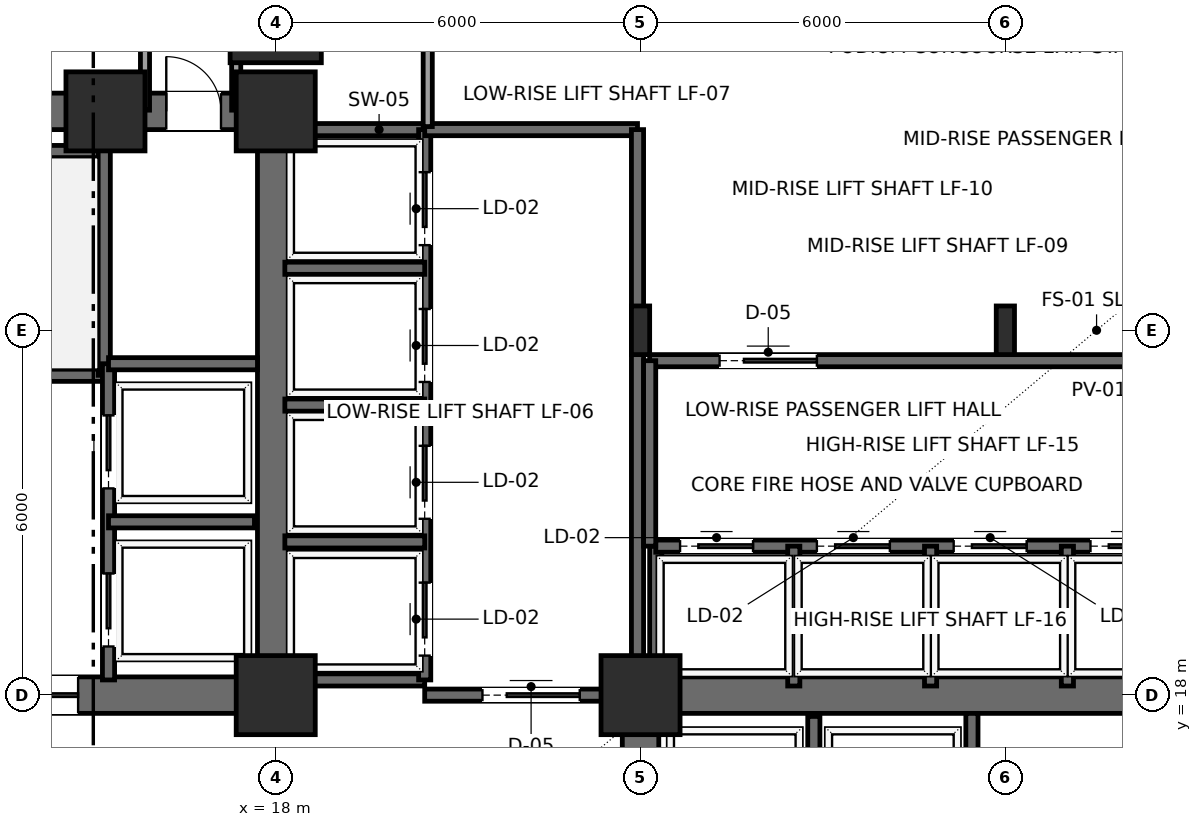
"""IFC4 building model, lengths in metres.
Left out: names, types, materials, properties, quantities, classifications, styles, units other than length and angle.
Written with IfcOpenShell. Run it as: python <this file> out.ifc"""

import sys

from ifc_helpers import new_model, si_unit, direction, frame, frame_2d, origin, origin_2d, place, context, subcontext, project, spatial, rectangle, i_section, extrude, element, fill, save


model = new_model("IFC4")
c1 = context("Model", 3, precision=1e-05, world=origin(), true_north=direction((0.0, 1.0)))
c2 = subcontext(c1, "Body", "Model", "MODEL_VIEW")
j1 = project(units=[si_unit("LENGTHUNIT", "METRE"), si_unit("PLANEANGLEUNIT", "RADIAN")], contexts=[c1])
p1 = place(None, origin())
s1 = spatial("IfcSite", under=j1, at=p1, CompositionType="ELEMENT")
p2 = place(p1, origin())
s2 = spatial("IfcBuilding", under=s1, at=p2, CompositionType="ELEMENT")
p3 = place(p2, origin())
s3 = spatial("IfcBuildingStorey", under=s2, at=p3, CompositionType="ELEMENT", Elevation=0.0)
for number, where, z_axis, x_axis in (
    (1, (18.0, 18.0, 0.0), (0.0, 0.0, 1.0), (1.0, 0.0, 0.0)),
    (2, (15.2, 27.6, 0.0), (0.0, 0.0, 1.0), (1.0, 0.0, 0.0)),
    (3, (18.0, 27.6, 0.0), (0.0, 0.0, 1.0), (1.0, 0.0, 0.0)),
    (4, (24.0, 18.0, 0.0), (0.0, 0.0, 1.0), (1.0, 0.0, 0.0)),
):
    element("IfcColumn", number, at=place(p3, frame(where, z_axis=z_axis, x_axis=x_axis)), inside=s3, PredefinedType="COLUMN", context=c2, shape_type="SweptSolid", body=[
        extrude(rectangle(XDim=1.3, YDim=1.3, at=origin_2d()), origin(), (0.0, 0.0, 1.0), 5.7),
    ])
p4 = place(p3, frame((18.0, 29.15, 0.0), z_axis=(0.0, 0.0, 1.0), x_axis=(1.0, 0.0, 0.0)))
e5 = element("IfcColumn", 5, at=p4, inside=s3, PredefinedType="COLUMN", context=c2, shape_type="SweptSolid", body=[
    extrude(rectangle(XDim=1.5, YDim=1.5, at=origin_2d()), origin(), (0.0, 0.0, 1.0), 5.7),
])
for number, where, z_axis, x_axis in (
    (6, (24.0, 24.0, 0.0), (0.0, 0.0, 1.0), (1.0, 0.0, 0.0)),
    (7, (30.0, 24.0, 0.0), (0.0, 0.0, 1.0), (1.0, 0.0, 0.0)),
):
    element("IfcColumn", number, at=place(p3, frame(where, z_axis=z_axis, x_axis=x_axis)), inside=s3, PredefinedType="COLUMN", context=c2, shape_type="SweptSolid", body=[
        extrude(i_section(OverallWidth=0.3, OverallDepth=0.8, WebThickness=0.018, FlangeThickness=0.033, FilletRadius=0.03, at=origin_2d()), origin(), (0.0, 0.0, 1.0), 5.7),
    ])
p5 = place(p3, frame((6.0, 18.0, 0.0), z_axis=(0.0, 0.0, 1.0), x_axis=(1.0, 0.0, 0.0)))
e8 = element("IfcWall", 8, at=p5, inside=s3, PredefinedType="SHEAR", context=c2, shape_type="SweptSolid", body=[
    extrude(rectangle(XDim=12.0, YDim=0.6, at=frame_2d((6.0, 0.0))), origin(), (0.0, 0.0, 1.0), 5.4),
])
p6 = place(p5, frame((7.15, 0.0, 0.0)))
e9 = element("IfcOpeningElement", 9, at=p6, cuts=e8, PredefinedType="OPENING", context=c2, shape_type="SweptSolid", body=[
    extrude(rectangle(XDim=1.6, YDim=2.3, at=frame_2d((0.8, 1.15))), frame((0.0, 0.31, 0.0), z_axis=(0.0, -1.0, 0.0), x_axis=(1.0, 0.0, 0.0)), (0.0, 0.0, 1.0), 0.62),
])
p7 = place(p3, frame((6.0, 27.6, 0.0), z_axis=(0.0, 0.0, 1.0), x_axis=(1.0, 0.0, 0.0)))
e10 = element("IfcWall", 10, at=p7, inside=s3, PredefinedType="SHEAR", context=c2, shape_type="SweptSolid", body=[
    extrude(rectangle(XDim=12.0, YDim=0.6, at=frame_2d((6.0, 0.0))), origin(), (0.0, 0.0, 1.0), 5.4),
])
p8 = place(p7, frame((10.2, 0.0, 0.0)))
e11 = element("IfcOpeningElement", 11, at=p8, cuts=e10, PredefinedType="OPENING", context=c2, shape_type="SweptSolid", body=[
    extrude(rectangle(XDim=0.9, YDim=2.15, at=frame_2d((0.45, 1.075))), frame((0.0, 0.31, 0.0), z_axis=(0.0, -1.0, 0.0), x_axis=(1.0, 0.0, 0.0)), (0.0, 0.0, 1.0), 0.62),
])
for number, where, z_axis, x_axis in (
    (12, (18.0, 18.0, 0.0), (0.0, 0.0, 1.0), (0.0, 1.0, 0.0)),
    (13, (24.0, 18.0, 0.0), (0.0, 0.0, 1.0), (1.0, 0.0, 0.0)),
):
    element("IfcWall", number, at=place(p3, frame(where, z_axis=z_axis, x_axis=x_axis)), inside=s3, PredefinedType="SHEAR", context=c2, shape_type="SweptSolid", body=[
        extrude(rectangle(XDim=9.6, YDim=0.6, at=frame_2d((4.8, 0.0))), origin(), (0.0, 0.0, 1.0), 5.4),
    ])
p9 = place(p3, frame((24.0, 6.0, 0.0), z_axis=(0.0, 0.0, 1.0), x_axis=(0.0, 1.0, 0.0)))
e14 = element("IfcWall", 14, at=p9, inside=s3, PredefinedType="SHEAR", context=c2, shape_type="SweptSolid", body=[
    extrude(rectangle(XDim=12.0, YDim=0.6, at=frame_2d((6.0, 0.0))), origin(), (0.0, 0.0, 1.0), 5.4),
])
p10 = place(p9, frame((7.15, 0.0, 0.0)))
e15 = element("IfcOpeningElement", 15, at=p10, cuts=e14, PredefinedType="OPENING", context=c2, shape_type="SweptSolid", body=[
    extrude(rectangle(XDim=1.6, YDim=2.3, at=frame_2d((0.8, 1.15))), frame((0.0, 0.31, 0.0), z_axis=(0.0, -1.0, 0.0), x_axis=(1.0, 0.0, 0.0)), (0.0, 0.0, 1.0), 0.62),
])
p11 = place(p3, frame((6.3, 23.26, 0.0), z_axis=(0.0, 0.0, 1.0), x_axis=(1.0, 0.0, 0.0)))
e16 = element("IfcWall", 16, at=p11, inside=s3, PredefinedType="SHEAR", context=c2, shape_type="SweptSolid", body=[
    extrude(rectangle(XDim=8.88, YDim=0.2, at=frame_2d((4.44, 0.0))), origin(), (0.0, 0.0, 1.0), 5.4),
])
p12 = place(p11, frame((0.35, 0.0, 0.0)))
e17 = element("IfcOpeningElement", 17, at=p12, cuts=e16, PredefinedType="OPENING", context=c2, shape_type="SweptSolid", body=[
    extrude(rectangle(XDim=1.1, YDim=2.2, at=frame_2d((0.55, 1.1))), frame((0.0, 0.11, 0.0), z_axis=(0.0, -1.0, 0.0), x_axis=(1.0, 0.0, 0.0)), (0.0, 0.0, 1.0), 0.22),
])
p13 = place(p3, frame((6.3, 26.94, 0.0), z_axis=(0.0, 0.0, 1.0), x_axis=(1.0, 0.0, 0.0)))
e18 = element("IfcWall", 18, at=p13, inside=s3, PredefinedType="SHEAR", context=c2, shape_type="SweptSolid", body=[
    extrude(rectangle(XDim=8.88, YDim=0.2, at=frame_2d((4.44, 0.0))), origin(), (0.0, 0.0, 1.0), 5.4),
])
p14 = place(p3, frame((15.18, 23.26, 0.0), z_axis=(0.0, 0.0, 1.0), x_axis=(0.0, 1.0, 0.0)))
e19 = element("IfcWall", 19, at=p14, inside=s3, PredefinedType="SHEAR", context=c2, shape_type="SweptSolid", body=[
    extrude(rectangle(XDim=4.04, YDim=0.2, at=frame_2d((2.02, 0.0))), origin(), (0.0, 0.0, 1.0), 5.4),
])
p15 = place(p3, frame((15.25, 18.25, 0.0), z_axis=(0.0, 0.0, 1.0), x_axis=(0.0, 1.0, 0.0)))
e20 = element("IfcWall", 20, at=p15, inside=s3, PredefinedType="SHEAR", context=c2, shape_type="SweptSolid", body=[
    extrude(rectangle(XDim=5.2, YDim=0.2, at=frame_2d((2.6, 0.0))), origin(), (0.0, 0.0, 1.0), 5.4),
])
p16 = place(p15, frame((0.55, 0.0, 0.0)))
e21 = element("IfcOpeningElement", 21, at=p16, cuts=e20, PredefinedType="OPENING", context=c2, shape_type="SweptSolid", body=[
    extrude(rectangle(XDim=1.2, YDim=2.2, at=frame_2d((0.6, 1.1))), frame((0.0, 0.11, 0.0), z_axis=(0.0, -1.0, 0.0), x_axis=(1.0, 0.0, 0.0)), (0.0, 0.0, 1.0), 0.22),
])
p17 = place(p15, frame((3.15, 0.0, 0.0)))
e22 = element("IfcOpeningElement", 22, at=p17, cuts=e20, PredefinedType="OPENING", context=c2, shape_type="SweptSolid", body=[
    extrude(rectangle(XDim=1.2, YDim=2.2, at=frame_2d((0.6, 1.1))), frame((0.0, 0.11, 0.0), z_axis=(0.0, -1.0, 0.0), x_axis=(1.0, 0.0, 0.0)), (0.0, 0.0, 1.0), 0.22),
])
p18 = place(p3, frame((15.25, 20.85, 0.0), z_axis=(0.0, 0.0, 1.0), x_axis=(1.0, 0.0, 0.0)))
e23 = element("IfcWall", 23, at=p18, inside=s3, PredefinedType="SHEAR", context=c2, shape_type="SweptSolid", body=[
    extrude(rectangle(XDim=2.4, YDim=0.2, at=frame_2d((1.2, 0.0))), origin(), (0.0, 0.0, 1.0), 5.4),
])
p19 = place(p3, frame((15.25, 23.45, 0.0), z_axis=(0.0, 0.0, 1.0), x_axis=(1.0, 0.0, 0.0)))
e24 = element("IfcWall", 24, at=p19, inside=s3, PredefinedType="SHEAR", context=c2, shape_type="SweptSolid", body=[
    extrude(rectangle(XDim=2.45, YDim=0.2, at=frame_2d((1.225, 0.0))), origin(), (0.0, 0.0, 1.0), 5.4),
])
p20 = place(p3, frame((26.85, 15.25, 0.0), z_axis=(0.0, 0.0, 1.0), x_axis=(0.0, 1.0, 0.0)))
e25 = element("IfcWall", 25, at=p20, inside=s3, PredefinedType="SHEAR", context=c2, shape_type="SweptSolid", body=[
    extrude(rectangle(XDim=2.4, YDim=0.2, at=frame_2d((1.2, 0.0))), origin(), (0.0, 0.0, 1.0), 5.4),
])
p21 = place(p3, frame((29.45, 15.25, 0.0), z_axis=(0.0, 0.0, 1.0), x_axis=(0.0, 1.0, 0.0)))
e26 = element("IfcWall", 26, at=p21, inside=s3, PredefinedType="SHEAR", context=c2, shape_type="SweptSolid", body=[
    extrude(rectangle(XDim=2.45, YDim=0.2, at=frame_2d((1.225, 0.0))), origin(), (0.0, 0.0, 1.0), 5.4),
])
for number, where, z_axis, x_axis in (
    (27, (18.1, 27.3, 0.0), (0.0, 0.0, 1.0), (1.0, 0.0, 0.0)),
    (28, (18.1, 18.25, 0.0), (0.0, 0.0, 1.0), (1.0, 0.0, 0.0)),
):
    element("IfcWall", number, at=place(p3, frame(where, z_axis=z_axis, x_axis=x_axis)), inside=s3, PredefinedType="SHEAR", context=c2, shape_type="SweptSolid", body=[
        extrude(rectangle(XDim=2.35, YDim=0.2, at=frame_2d((1.175, 0.0))), origin(), (0.0, 0.0, 1.0), 5.4),
    ])
p22 = place(p3, frame((20.45, 18.25, 0.0), z_axis=(0.0, 0.0, 1.0), x_axis=(0.0, 1.0, 0.0)))
e29 = element("IfcWall", 29, at=p22, inside=s3, PredefinedType="SHEAR", context=c2, shape_type="SweptSolid", body=[
    extrude(rectangle(XDim=9.05, YDim=0.2, at=frame_2d((4.525, 0.0))), origin(), (0.0, 0.0, 1.0), 5.4),
])
p23 = place(p22, frame((0.4, 0.0, 0.0)))
e30 = element("IfcOpeningElement", 30, at=p23, cuts=e29, PredefinedType="OPENING", context=c2, shape_type="SweptSolid", body=[
    extrude(rectangle(XDim=1.2, YDim=2.2, at=frame_2d((0.6, 1.1))), frame((0.0, 0.11, 0.0), z_axis=(0.0, -1.0, 0.0), x_axis=(1.0, 0.0, 0.0)), (0.0, 0.0, 1.0), 0.22),
])
p24 = place(p22, frame((2.65, 0.0, 0.0)))
e31 = element("IfcOpeningElement", 31, at=p24, cuts=e29, PredefinedType="OPENING", context=c2, shape_type="SweptSolid", body=[
    extrude(rectangle(XDim=1.2, YDim=2.2, at=frame_2d((0.6, 1.1))), frame((0.0, 0.11, 0.0), z_axis=(0.0, -1.0, 0.0), x_axis=(1.0, 0.0, 0.0)), (0.0, 0.0, 1.0), 0.22),
])
p25 = place(p22, frame((4.9, 0.0, 0.0)))
e32 = element("IfcOpeningElement", 32, at=p25, cuts=e29, PredefinedType="OPENING", context=c2, shape_type="SweptSolid", body=[
    extrude(rectangle(XDim=1.2, YDim=2.2, at=frame_2d((0.6, 1.1))), frame((0.0, 0.11, 0.0), z_axis=(0.0, -1.0, 0.0), x_axis=(1.0, 0.0, 0.0)), (0.0, 0.0, 1.0), 0.22),
])
p26 = place(p22, frame((7.15, 0.0, 0.0)))
e33 = element("IfcOpeningElement", 33, at=p26, cuts=e29, PredefinedType="OPENING", context=c2, shape_type="SweptSolid", body=[
    extrude(rectangle(XDim=1.2, YDim=2.2, at=frame_2d((0.6, 1.1))), frame((0.0, 0.11, 0.0), z_axis=(0.0, -1.0, 0.0), x_axis=(1.0, 0.0, 0.0)), (0.0, 0.0, 1.0), 0.22),
])
for number, where, z_axis, x_axis in (
    (34, (18.15, 20.52, 0.0), (0.0, 0.0, 1.0), (1.0, 0.0, 0.0)),
    (35, (18.15, 22.77, 0.0), (0.0, 0.0, 1.0), (1.0, 0.0, 0.0)),
    (36, (18.15, 25.02, 0.0), (0.0, 0.0, 1.0), (1.0, 0.0, 0.0)),
):
    element("IfcWall", number, at=place(p3, frame(where, z_axis=z_axis, x_axis=x_axis)), inside=s3, PredefinedType="SHEAR", context=c2, shape_type="SweptSolid", body=[
        extrude(rectangle(XDim=2.3, YDim=0.2, at=frame_2d((1.15, 0.0))), origin(), (0.0, 0.0, 1.0), 5.4),
    ])
p27 = place(p3, frame((20.45, 18.0, 0.0), z_axis=(0.0, 0.0, 1.0), x_axis=(1.0, 0.0, 0.0)))
e37 = element("IfcWall", 37, at=p27, inside=s3, PredefinedType="SHEAR", context=c2, shape_type="SweptSolid", body=[
    extrude(rectangle(XDim=3.5, YDim=0.2, at=frame_2d((1.75, 0.0))), origin(), (0.0, 0.0, 1.0), 5.4),
])
p28 = place(p27, frame((0.95, 0.0, 0.0)))
e38 = element("IfcOpeningElement", 38, at=p28, cuts=e37, PredefinedType="OPENING", context=c2, shape_type="SweptSolid", body=[
    extrude(rectangle(XDim=1.6, YDim=2.3, at=frame_2d((0.8, 1.15))), frame((0.0, 0.11, 0.0), z_axis=(0.0, -1.0, 0.0), x_axis=(1.0, 0.0, 0.0)), (0.0, 0.0, 1.0), 0.22),
])
p29 = place(p3, frame((20.45, 27.3, 0.0), z_axis=(0.0, 0.0, 1.0), x_axis=(1.0, 0.0, 0.0)))
e39 = element("IfcWall", 39, at=p29, inside=s3, PredefinedType="SHEAR", context=c2, shape_type="SweptSolid", body=[
    extrude(rectangle(XDim=3.5, YDim=0.2, at=frame_2d((1.75, 0.0))), origin(), (0.0, 0.0, 1.0), 5.4),
])
p30 = place(p3, frame((23.95, 18.0, 0.0), z_axis=(0.0, 0.0, 1.0), x_axis=(0.0, 1.0, 0.0)))
e40 = element("IfcWall", 40, at=p30, inside=s3, PredefinedType="SHEAR", context=c2, shape_type="SweptSolid", body=[
    extrude(rectangle(XDim=9.3, YDim=0.2, at=frame_2d((4.65, 0.0))), origin(), (0.0, 0.0, 1.0), 5.4),
])
p31 = place(p3, frame((24.25, 18.1, 0.0), z_axis=(0.0, 0.0, 1.0), x_axis=(0.0, 1.0, 0.0)))
e41 = element("IfcWall", 41, at=p31, inside=s3, PredefinedType="SHEAR", context=c2, shape_type="SweptSolid", body=[
    extrude(rectangle(XDim=2.35, YDim=0.2, at=frame_2d((1.175, 0.0))), origin(), (0.0, 0.0, 1.0), 5.4),
])
p32 = place(p3, frame((24.25, 20.45, 0.0), z_axis=(0.0, 0.0, 1.0), x_axis=(1.0, 0.0, 0.0)))
e42 = element("IfcWall", 42, at=p32, inside=s3, PredefinedType="SHEAR", context=c2, shape_type="SweptSolid", body=[
    extrude(rectangle(XDim=9.05, YDim=0.2, at=frame_2d((4.525, 0.0))), origin(), (0.0, 0.0, 1.0), 5.4),
])
p33 = place(p32, frame((0.4, 0.0, 0.0)))
e43 = element("IfcOpeningElement", 43, at=p33, cuts=e42, PredefinedType="OPENING", context=c2, shape_type="SweptSolid", body=[
    extrude(rectangle(XDim=1.2, YDim=2.2, at=frame_2d((0.6, 1.1))), frame((0.0, 0.11, 0.0), z_axis=(0.0, -1.0, 0.0), x_axis=(1.0, 0.0, 0.0)), (0.0, 0.0, 1.0), 0.22),
])
p34 = place(p32, frame((2.65, 0.0, 0.0)))
e44 = element("IfcOpeningElement", 44, at=p34, cuts=e42, PredefinedType="OPENING", context=c2, shape_type="SweptSolid", body=[
    extrude(rectangle(XDim=1.2, YDim=2.2, at=frame_2d((0.6, 1.1))), frame((0.0, 0.11, 0.0), z_axis=(0.0, -1.0, 0.0), x_axis=(1.0, 0.0, 0.0)), (0.0, 0.0, 1.0), 0.22),
])
p35 = place(p32, frame((4.9, 0.0, 0.0)))
e45 = element("IfcOpeningElement", 45, at=p35, cuts=e42, PredefinedType="OPENING", context=c2, shape_type="SweptSolid", body=[
    extrude(rectangle(XDim=1.2, YDim=2.2, at=frame_2d((0.6, 1.1))), frame((0.0, 0.11, 0.0), z_axis=(0.0, -1.0, 0.0), x_axis=(1.0, 0.0, 0.0)), (0.0, 0.0, 1.0), 0.22),
])
p36 = place(p32, frame((7.15, 0.0, 0.0)))
e46 = element("IfcOpeningElement", 46, at=p36, cuts=e42, PredefinedType="OPENING", context=c2, shape_type="SweptSolid", body=[
    extrude(rectangle(XDim=1.2, YDim=2.2, at=frame_2d((0.6, 1.1))), frame((0.0, 0.11, 0.0), z_axis=(0.0, -1.0, 0.0), x_axis=(1.0, 0.0, 0.0)), (0.0, 0.0, 1.0), 0.22),
])
for number, where, z_axis, x_axis in (
    (47, (26.52, 18.15, 0.0), (0.0, 0.0, 1.0), (0.0, 1.0, 0.0)),
    (48, (28.77, 18.15, 0.0), (0.0, 0.0, 1.0), (0.0, 1.0, 0.0)),
    (49, (31.02, 18.15, 0.0), (0.0, 0.0, 1.0), (0.0, 1.0, 0.0)),
):
    element("IfcWall", number, at=place(p3, frame(where, z_axis=z_axis, x_axis=x_axis)), inside=s3, PredefinedType="SHEAR", context=c2, shape_type="SweptSolid", body=[
        extrude(rectangle(XDim=2.3, YDim=0.2, at=frame_2d((1.15, 0.0))), origin(), (0.0, 0.0, 1.0), 5.4),
    ])
p37 = place(p3, frame((24.15, 23.5, 0.0), z_axis=(0.0, 0.0, 1.0), x_axis=(1.0, 0.0, 0.0)))
e50 = element("IfcWall", 50, at=p37, inside=s3, PredefinedType="SHEAR", context=c2, shape_type="SweptSolid", body=[
    extrude(rectangle(XDim=9.15, YDim=0.2, at=frame_2d((4.575, 0.0))), origin(), (0.0, 0.0, 1.0), 5.4),
])
p38 = place(p37, frame((1.15, 0.0, 0.0)))
e51 = element("IfcOpeningElement", 51, at=p38, cuts=e50, PredefinedType="OPENING", context=c2, shape_type="SweptSolid", body=[
    extrude(rectangle(XDim=1.6, YDim=2.3, at=frame_2d((0.8, 1.15))), frame((0.0, 0.11, 0.0), z_axis=(0.0, -1.0, 0.0), x_axis=(1.0, 0.0, 0.0)), (0.0, 0.0, 1.0), 0.22),
])
p39 = place(p3, frame((24.15, 20.45, 0.0), z_axis=(0.0, 0.0, 1.0), x_axis=(0.0, 1.0, 0.0)))
e52 = element("IfcWall", 52, at=p39, inside=s3, PredefinedType="SHEAR", context=c2, shape_type="SweptSolid", body=[
    extrude(rectangle(XDim=3.05, YDim=0.2, at=frame_2d((1.525, 0.0))), origin(), (0.0, 0.0, 1.0), 5.4),
])
p40 = place(p3, frame((20.5, 27.35, 0.0), z_axis=(0.0, 0.0, 1.0), x_axis=(0.0, 1.0, 0.0)))
e53 = element("IfcWall", 53, at=p40, inside=s3, PredefinedType="PARTITIONING", context=c2, shape_type="SweptSolid", body=[
    extrude(rectangle(XDim=2.85, YDim=0.15, at=frame_2d((1.425, 0.0))), origin(), (0.0, 0.0, 1.0), 5.4),
])
for number, where, z_axis, x_axis in (
    (54, (17.35, 30.2, 0.0), (0.0, 0.0, 1.0), (0.0, -1.0, 0.0)),
    (55, (15.85, 27.62, 0.0), (0.0, 0.0, 1.0), (0.0, 1.0, 0.0)),
):
    element("IfcWall", number, at=place(p3, frame(where, z_axis=z_axis, x_axis=x_axis)), inside=s3, PredefinedType="PARTITIONING", context=c2, shape_type="SweptSolid", body=[
        extrude(rectangle(XDim=2.58, YDim=0.15, at=frame_2d((1.29, 0.0))), origin(), (0.0, 0.0, 1.0), 5.4),
    ])
p41 = place(p6, origin())
e56 = element("IfcDoor", 56, at=p41, inside=s3, OperationType="DOUBLE_DOOR_SLIDING", PredefinedType="DOOR", context=c2, shape_type="SweptSolid", body=[
    extrude(rectangle(XDim=1.6, YDim=2.3, at=frame_2d((0.8, 1.15))), frame((0.0, 0.025, 0.0), z_axis=(0.0, -1.0, 0.0), x_axis=(1.0, 0.0, 0.0)), (0.0, 0.0, 1.0), 0.05),
])
fill(e9, e56)
p42 = place(p8, origin())
e57 = element("IfcDoor", 57, at=p42, inside=s3, OperationType="SINGLE_SWING_LEFT", PredefinedType="DOOR", context=c2, shape_type="SweptSolid", body=[
    extrude(rectangle(XDim=0.9, YDim=2.15, at=frame_2d((0.45, 1.075))), frame((0.0, 0.025, 0.0), z_axis=(0.0, -1.0, 0.0), x_axis=(1.0, 0.0, 0.0)), (0.0, 0.0, 1.0), 0.05),
])
fill(e11, e57)
p43 = place(p16, origin())
e58 = element("IfcDoor", 58, at=p43, inside=s3, OperationType="SLIDING_TO_RIGHT", PredefinedType="DOOR", context=c2, shape_type="SweptSolid", body=[
    extrude(rectangle(XDim=1.2, YDim=2.2, at=frame_2d((0.6, 1.1))), frame((0.0, 0.025, 0.0), z_axis=(0.0, -1.0, 0.0), x_axis=(1.0, 0.0, 0.0)), (0.0, 0.0, 1.0), 0.05),
])
fill(e21, e58)
p44 = place(p17, origin())
e59 = element("IfcDoor", 59, at=p44, inside=s3, OperationType="SLIDING_TO_RIGHT", PredefinedType="DOOR", context=c2, shape_type="SweptSolid", body=[
    extrude(rectangle(XDim=1.2, YDim=2.2, at=frame_2d((0.6, 1.1))), frame((0.0, 0.025, 0.0), z_axis=(0.0, -1.0, 0.0), x_axis=(1.0, 0.0, 0.0)), (0.0, 0.0, 1.0), 0.05),
])
fill(e22, e59)
p45 = place(p23, origin())
e60 = element("IfcDoor", 60, at=p45, inside=s3, OperationType="SLIDING_TO_RIGHT", PredefinedType="DOOR", context=c2, shape_type="SweptSolid", body=[
    extrude(rectangle(XDim=1.2, YDim=2.2, at=frame_2d((0.6, 1.1))), frame((0.0, 0.025, 0.0), z_axis=(0.0, -1.0, 0.0), x_axis=(1.0, 0.0, 0.0)), (0.0, 0.0, 1.0), 0.05),
])
fill(e30, e60)
p46 = place(p24, origin())
e61 = element("IfcDoor", 61, at=p46, inside=s3, OperationType="SLIDING_TO_RIGHT", PredefinedType="DOOR", context=c2, shape_type="SweptSolid", body=[
    extrude(rectangle(XDim=1.2, YDim=2.2, at=frame_2d((0.6, 1.1))), frame((0.0, 0.025, 0.0), z_axis=(0.0, -1.0, 0.0), x_axis=(1.0, 0.0, 0.0)), (0.0, 0.0, 1.0), 0.05),
])
fill(e31, e61)
p47 = place(p25, origin())
e62 = element("IfcDoor", 62, at=p47, inside=s3, OperationType="SLIDING_TO_RIGHT", PredefinedType="DOOR", context=c2, shape_type="SweptSolid", body=[
    extrude(rectangle(XDim=1.2, YDim=2.2, at=frame_2d((0.6, 1.1))), frame((0.0, 0.025, 0.0), z_axis=(0.0, -1.0, 0.0), x_axis=(1.0, 0.0, 0.0)), (0.0, 0.0, 1.0), 0.05),
])
fill(e32, e62)
p48 = place(p26, origin())
e63 = element("IfcDoor", 63, at=p48, inside=s3, OperationType="SLIDING_TO_RIGHT", PredefinedType="DOOR", context=c2, shape_type="SweptSolid", body=[
    extrude(rectangle(XDim=1.2, YDim=2.2, at=frame_2d((0.6, 1.1))), frame((0.0, 0.025, 0.0), z_axis=(0.0, -1.0, 0.0), x_axis=(1.0, 0.0, 0.0)), (0.0, 0.0, 1.0), 0.05),
])
fill(e33, e63)
p49 = place(p28, origin())
e64 = element("IfcDoor", 64, at=p49, inside=s3, OperationType="DOUBLE_DOOR_SLIDING", PredefinedType="DOOR", context=c2, shape_type="SweptSolid", body=[
    extrude(rectangle(XDim=1.6, YDim=2.3, at=frame_2d((0.8, 1.15))), frame((0.0, 0.025, 0.0), z_axis=(0.0, -1.0, 0.0), x_axis=(1.0, 0.0, 0.0)), (0.0, 0.0, 1.0), 0.05),
])
fill(e38, e64)
p50 = place(p33, origin())
e65 = element("IfcDoor", 65, at=p50, inside=s3, OperationType="SLIDING_TO_RIGHT", PredefinedType="DOOR", context=c2, shape_type="SweptSolid", body=[
    extrude(rectangle(XDim=1.2, YDim=2.2, at=frame_2d((0.6, 1.1))), frame((0.0, 0.025, 0.0), z_axis=(0.0, -1.0, 0.0), x_axis=(1.0, 0.0, 0.0)), (0.0, 0.0, 1.0), 0.05),
])
fill(e43, e65)
p51 = place(p34, origin())
e66 = element("IfcDoor", 66, at=p51, inside=s3, OperationType="SLIDING_TO_RIGHT", PredefinedType="DOOR", context=c2, shape_type="SweptSolid", body=[
    extrude(rectangle(XDim=1.2, YDim=2.2, at=frame_2d((0.6, 1.1))), frame((0.0, 0.025, 0.0), z_axis=(0.0, -1.0, 0.0), x_axis=(1.0, 0.0, 0.0)), (0.0, 0.0, 1.0), 0.05),
])
fill(e44, e66)
p52 = place(p35, origin())
e67 = element("IfcDoor", 67, at=p52, inside=s3, OperationType="SLIDING_TO_RIGHT", PredefinedType="DOOR", context=c2, shape_type="SweptSolid", body=[
    extrude(rectangle(XDim=1.2, YDim=2.2, at=frame_2d((0.6, 1.1))), frame((0.0, 0.025, 0.0), z_axis=(0.0, -1.0, 0.0), x_axis=(1.0, 0.0, 0.0)), (0.0, 0.0, 1.0), 0.05),
])
fill(e45, e67)
p53 = place(p36, origin())
e68 = element("IfcDoor", 68, at=p53, inside=s3, OperationType="SLIDING_TO_RIGHT", PredefinedType="DOOR", context=c2, shape_type="SweptSolid", body=[
    extrude(rectangle(XDim=1.2, YDim=2.2, at=frame_2d((0.6, 1.1))), frame((0.0, 0.025, 0.0), z_axis=(0.0, -1.0, 0.0), x_axis=(1.0, 0.0, 0.0)), (0.0, 0.0, 1.0), 0.05),
])
fill(e46, e68)
p54 = place(p38, origin())
e69 = element("IfcDoor", 69, at=p54, inside=s3, OperationType="DOUBLE_DOOR_SLIDING", PredefinedType="DOOR", context=c2, shape_type="SweptSolid", body=[
    extrude(rectangle(XDim=1.6, YDim=2.3, at=frame_2d((0.8, 1.15))), frame((0.0, 0.025, 0.0), z_axis=(0.0, -1.0, 0.0), x_axis=(1.0, 0.0, 0.0)), (0.0, 0.0, 1.0), 0.05),
])
fill(e51, e69)
save(model, sys.argv[1])
